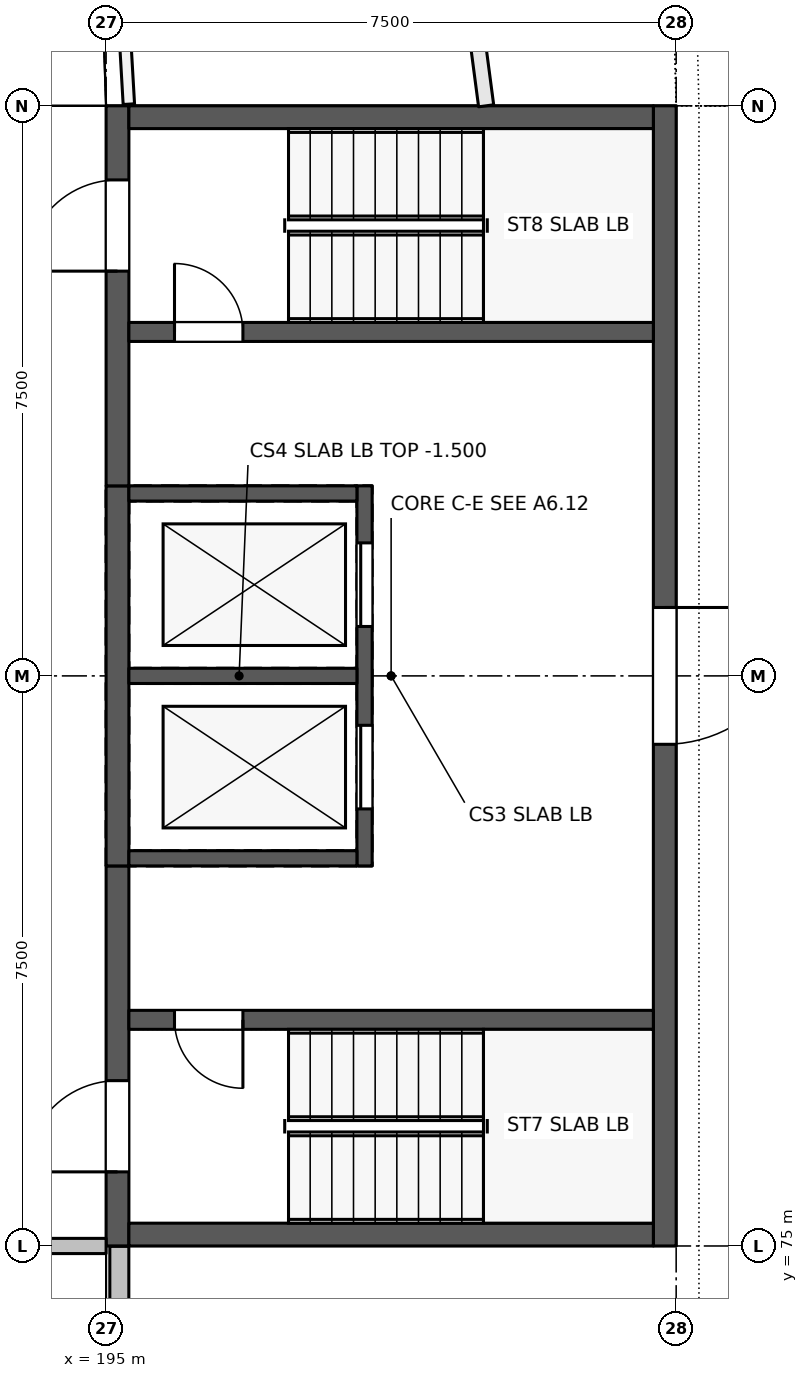
"""IFC4 building model, lengths in metres.
Left out: names, types, materials, properties, quantities, classifications, styles, units other than length and angle.
Written with IfcOpenShell. Run it as: python <this file> out.ifc"""

import sys

from ifc_helpers import new_model, si_unit, direction, frame, frame_2d, origin, place, context, subcontext, project, spatial, rectangle, extrude, element, fill, save


model = new_model("IFC4")
c1 = context("Model", 3, precision=1e-05, world=origin(), true_north=direction((0.0, 1.0)))
c2 = subcontext(c1, "Body", "Model", "MODEL_VIEW")
j1 = project(units=[si_unit("LENGTHUNIT", "METRE"), si_unit("PLANEANGLEUNIT", "RADIAN")], contexts=[c1])
p1 = place(None, origin())
s1 = spatial("IfcSite", under=j1, at=p1, CompositionType="ELEMENT")
p2 = place(p1, origin())
s2 = spatial("IfcBuilding", under=s1, at=p2, CompositionType="ELEMENT")
p3 = place(p2, origin())
s3 = spatial("IfcBuildingStorey", under=s2, at=p3, CompositionType="ELEMENT", Elevation=0.0)
p4 = place(p3, frame((199.08, 96.989, 0.0), z_axis=(0.0, 0.0, 1.0), x_axis=(0.130498411199, -0.991448518419, 0.0)))
e1 = element("IfcWall", 1, at=p4, inside=s3, PredefinedType="PARTITIONING", context=c2, shape_type="SweptSolid", body=[
    extrude(rectangle(XDim=7.049, YDim=0.2, at=frame_2d((3.525, 0.0))), origin(), (0.0, 0.0, 1.0), 2.548),
])
p5 = place(p4, frame((3.05, 0.0, 0.0)))
e2 = element("IfcOpeningElement", 2, at=p5, cuts=e1, PredefinedType="OPENING", context=c2, shape_type="SweptSolid", body=[
    extrude(rectangle(XDim=0.9, YDim=2.1, at=frame_2d((0.45, 1.05))), frame((0.0, 0.11, 0.0), z_axis=(0.0, -1.0, 0.0), x_axis=(1.0, 0.0, 0.0)), (0.0, 0.0, 1.0), 0.22),
])
p6 = place(p3, frame((195.174, 74.995, 0.0), z_axis=(0.0, 0.0, 1.0), x_axis=(0.0, -1.0, 0.0)))
e3 = element("IfcWall", 3, at=p6, inside=s3, PredefinedType="SOLIDWALL", context=c2, shape_type="SweptSolid", body=[
    extrude(rectangle(XDim=7.299, YDim=0.25, at=frame_2d((3.649, 0.0))), origin(), (0.0, 0.0, 1.0), 1.1),
])
p7 = place(p3, frame((187.656, 75.0, 0.0), z_axis=(0.0, 0.0, 1.0), x_axis=(1.0, 0.0, 0.0)))
e4 = element("IfcWall", 4, at=p7, inside=s3, PredefinedType="SOLIDWALL", context=c2, shape_type="SweptSolid", body=[
    extrude(rectangle(XDim=7.344, YDim=0.2, at=frame_2d((3.672, 0.0))), origin(), (0.0, 0.0, 1.0), 2.627),
])
p8 = place(p3, frame((202.35, 90.0, 0.0), z_axis=(0.0, 0.0, 1.0), x_axis=(0.0, -1.0, 0.0)))
e5 = element("IfcWall", 5, at=p8, inside=s3, PredefinedType="SHEAR", context=c2, shape_type="SweptSolid", body=[
    extrude(rectangle(XDim=15.0, YDim=0.3, at=frame_2d((7.5, 0.0))), origin(), (0.0, 0.0, 1.0), 3.3),
])
p9 = place(p8, frame((6.6, 0.0, 0.0)))
e6 = element("IfcOpeningElement", 6, at=p9, cuts=e5, PredefinedType="OPENING", context=c2, shape_type="SweptSolid", body=[
    extrude(rectangle(XDim=1.8, YDim=2.1, at=frame_2d((0.9, 1.05))), frame((0.0, 0.16, 0.0), z_axis=(0.0, -1.0, 0.0), x_axis=(1.0, 0.0, 0.0)), (0.0, 0.0, 1.0), 0.32),
])
p10 = place(p3, frame((195.15, 75.0, 0.0), z_axis=(0.0, 0.0, 1.0), x_axis=(0.0, 1.0, 0.0)))
e7 = element("IfcWall", 7, at=p10, inside=s3, PredefinedType="SHEAR", context=c2, shape_type="SweptSolid", body=[
    extrude(rectangle(XDim=5.0, YDim=0.3, at=frame_2d((2.5, 0.0))), origin(), (0.0, 0.0, 1.0), 3.3),
])
p11 = place(p10, frame((0.975, 0.0, 0.0)))
e8 = element("IfcOpeningElement", 8, at=p11, cuts=e7, PredefinedType="OPENING", context=c2, shape_type="SweptSolid", body=[
    extrude(rectangle(XDim=1.2, YDim=2.1, at=frame_2d((0.6, 1.05))), frame((0.0, 0.16, 0.0), z_axis=(0.0, -1.0, 0.0), x_axis=(1.0, 0.0, 0.0)), (0.0, 0.0, 1.0), 0.32),
])
p12 = place(p3, frame((195.15, 80.0, 0.0), z_axis=(0.0, 0.0, 1.0), x_axis=(0.0, 1.0, 0.0)))
e9 = element("IfcWall", 9, at=p12, inside=s3, PredefinedType="SHEAR", context=c2, shape_type="SweptSolid", body=[
    extrude(rectangle(XDim=5.0, YDim=0.3, at=frame_2d((2.5, 0.0))), origin(), (0.0, 0.0, 1.0), 3.3),
])
p13 = place(p3, frame((195.15, 85.0, 0.0), z_axis=(0.0, 0.0, 1.0), x_axis=(0.0, 1.0, 0.0)))
e10 = element("IfcWall", 10, at=p13, inside=s3, PredefinedType="SHEAR", context=c2, shape_type="SweptSolid", body=[
    extrude(rectangle(XDim=5.0, YDim=0.3, at=frame_2d((2.5, 0.0))), origin(), (0.0, 0.0, 1.0), 3.3),
])
p14 = place(p13, frame((2.825, 0.0, 0.0)))
e11 = element("IfcOpeningElement", 11, at=p14, cuts=e10, PredefinedType="OPENING", context=c2, shape_type="SweptSolid", body=[
    extrude(rectangle(XDim=1.2, YDim=2.1, at=frame_2d((0.6, 1.05))), frame((0.0, 0.16, 0.0), z_axis=(0.0, -1.0, 0.0), x_axis=(1.0, 0.0, 0.0)), (0.0, 0.0, 1.0), 0.32),
])
for number, where, z_axis, x_axis in (
    (12, (202.2, 75.15, 0.0), (0.0, 0.0, 1.0), (-1.0, 0.0, 0.0)),
    (13, (202.2, 89.85, 0.0), (0.0, 0.0, 1.0), (-1.0, 0.0, 0.0)),
):
    element("IfcWall", number, at=place(p3, frame(where, z_axis=z_axis, x_axis=x_axis)), inside=s3, PredefinedType="SHEAR", context=c2, shape_type="SweptSolid", body=[
        extrude(rectangle(XDim=6.9, YDim=0.3, at=frame_2d((3.45, 0.0))), origin(), (0.0, 0.0, 1.0), 3.3),
    ])
p15 = place(p3, frame((202.2, 77.975, 0.0), z_axis=(0.0, 0.0, 1.0), x_axis=(-1.0, 0.0, 0.0)))
e14 = element("IfcWall", 14, at=p15, inside=s3, PredefinedType="STANDARD", context=c2, shape_type="SweptSolid", body=[
    extrude(rectangle(XDim=6.9, YDim=0.25, at=frame_2d((3.45, 0.0))), origin(), (0.0, 0.0, 1.0), 3.1),
])
p16 = place(p15, frame((5.4, 0.0, 0.0)))
e15 = element("IfcOpeningElement", 15, at=p16, cuts=e14, PredefinedType="OPENING", context=c2, shape_type="SweptSolid", body=[
    extrude(rectangle(XDim=0.9, YDim=2.1, at=frame_2d((0.45, 1.05))), frame((0.0, 0.135, 0.0), z_axis=(0.0, -1.0, 0.0), x_axis=(1.0, 0.0, 0.0)), (0.0, 0.0, 1.0), 0.27),
])
p17 = place(p3, frame((195.3, 87.025, 0.0), z_axis=(0.0, 0.0, 1.0), x_axis=(1.0, 0.0, 0.0)))
e16 = element("IfcWall", 16, at=p17, inside=s3, PredefinedType="STANDARD", context=c2, shape_type="SweptSolid", body=[
    extrude(rectangle(XDim=6.9, YDim=0.25, at=frame_2d((3.45, 0.0))), origin(), (0.0, 0.0, 1.0), 3.1),
])
p18 = place(p17, frame((0.6, 0.0, 0.0)))
e17 = element("IfcOpeningElement", 17, at=p18, cuts=e16, PredefinedType="OPENING", context=c2, shape_type="SweptSolid", body=[
    extrude(rectangle(XDim=0.9, YDim=2.1, at=frame_2d((0.45, 1.05))), frame((0.0, 0.135, 0.0), z_axis=(0.0, -1.0, 0.0), x_axis=(1.0, 0.0, 0.0)), (0.0, 0.0, 1.0), 0.27),
])
p19 = place(p3, frame((198.4, 80.0, 0.0), z_axis=(0.0, 0.0, 1.0), x_axis=(0.0, 1.0, 0.0)))
e18 = element("IfcWall", 18, at=p19, inside=s3, PredefinedType="STANDARD", context=c2, shape_type="SweptSolid", body=[
    extrude(rectangle(XDim=5.0, YDim=0.2, at=frame_2d((2.5, 0.0))), origin(), (0.0, 0.0, 1.0), 3.1),
])
p20 = place(p19, frame((0.75, 0.0, 0.0)))
e19 = element("IfcOpeningElement", 19, at=p20, cuts=e18, PredefinedType="OPENING", context=c2, shape_type="SweptSolid", body=[
    extrude(rectangle(XDim=1.1, YDim=2.1, at=frame_2d((0.55, 1.05))), frame((0.0, 0.11, 0.0), z_axis=(0.0, -1.0, 0.0), x_axis=(1.0, 0.0, 0.0)), (0.0, 0.0, 1.0), 0.22),
])
p21 = place(p19, frame((3.15, 0.0, 0.0)))
e20 = element("IfcOpeningElement", 20, at=p21, cuts=e18, PredefinedType="OPENING", context=c2, shape_type="SweptSolid", body=[
    extrude(rectangle(XDim=1.1, YDim=2.1, at=frame_2d((0.55, 1.05))), frame((0.0, 0.11, 0.0), z_axis=(0.0, -1.0, 0.0), x_axis=(1.0, 0.0, 0.0)), (0.0, 0.0, 1.0), 0.22),
])
for number, where, z_axis, x_axis in (
    (21, (198.3, 80.1, 0.0), (0.0, 0.0, 1.0), (-1.0, 0.0, 0.0)),
    (22, (198.3, 82.5, 0.0), (0.0, 0.0, 1.0), (-1.0, 0.0, 0.0)),
    (23, (198.3, 84.9, 0.0), (0.0, 0.0, 1.0), (-1.0, 0.0, 0.0)),
):
    element("IfcWall", number, at=place(p3, frame(where, z_axis=z_axis, x_axis=x_axis)), inside=s3, PredefinedType="STANDARD", context=c2, shape_type="SweptSolid", body=[
        extrude(rectangle(XDim=3.0, YDim=0.2, at=frame_2d((1.5, 0.0))), origin(), (0.0, 0.0, 1.0), 3.1),
    ])
p22 = place(p3, frame((198.4, 80.0, -1.5), z_axis=(0.0, 0.0, 1.0), x_axis=(0.0, 1.0, 0.0)))
e24 = element("IfcWall", 24, at=p22, inside=s3, PredefinedType="STANDARD", context=c2, shape_type="SweptSolid", body=[
    extrude(rectangle(XDim=5.0, YDim=0.2, at=frame_2d((2.5, 0.0))), origin(), (0.0, 0.0, 1.0), 1.3),
])
for number, where, z_axis, x_axis in (
    (25, (198.3, 80.1, -1.5), (0.0, 0.0, 1.0), (-1.0, 0.0, 0.0)),
    (26, (198.3, 82.5, -1.5), (0.0, 0.0, 1.0), (-1.0, 0.0, 0.0)),
    (27, (198.3, 84.9, -1.5), (0.0, 0.0, 1.0), (-1.0, 0.0, 0.0)),
):
    element("IfcWall", number, at=place(p3, frame(where, z_axis=z_axis, x_axis=x_axis)), inside=s3, PredefinedType="STANDARD", context=c2, shape_type="SweptSolid", body=[
        extrude(rectangle(XDim=3.0, YDim=0.2, at=frame_2d((1.5, 0.0))), origin(), (0.0, 0.0, 1.0), 1.3),
    ])
p23 = place(p3, frame((195.15, 80.0, -1.5), z_axis=(0.0, 0.0, 1.0), x_axis=(0.0, 1.0, 0.0)))
e28 = element("IfcWall", 28, at=p23, inside=s3, PredefinedType="SHEAR", context=c2, shape_type="SweptSolid", body=[
    extrude(rectangle(XDim=5.0, YDim=0.3, at=frame_2d((2.5, 0.0))), origin(), (0.0, 0.0, 1.0), 1.3),
])
p24 = place(p9, origin())
e29 = element("IfcDoor", 29, at=p24, inside=s3, OperationType="DOUBLE_DOOR_SINGLE_SWING", PredefinedType="DOOR", context=c2, shape_type="SweptSolid", body=[
    extrude(rectangle(XDim=1.8, YDim=2.1, at=frame_2d((0.9, 1.05))), frame((0.0, 0.025, 0.0), z_axis=(0.0, -1.0, 0.0), x_axis=(1.0, 0.0, 0.0)), (0.0, 0.0, 1.0), 0.05),
])
fill(e6, e29)
p25 = place(p16, origin())
e30 = element("IfcDoor", 30, at=p25, inside=s3, OperationType="SINGLE_SWING_LEFT", PredefinedType="DOOR", context=c2, shape_type="SweptSolid", body=[
    extrude(rectangle(XDim=0.9, YDim=2.1, at=frame_2d((0.45, 1.05))), frame((0.0, 0.025, 0.0), z_axis=(0.0, -1.0, 0.0), x_axis=(1.0, 0.0, 0.0)), (0.0, 0.0, 1.0), 0.05),
])
fill(e15, e30)
p26 = place(p18, origin())
e31 = element("IfcDoor", 31, at=p26, inside=s3, OperationType="SINGLE_SWING_RIGHT", PredefinedType="DOOR", context=c2, shape_type="SweptSolid", body=[
    extrude(rectangle(XDim=0.9, YDim=2.1, at=frame_2d((0.45, 1.05))), frame((0.0, 0.025, 0.0), z_axis=(0.0, -1.0, 0.0), x_axis=(1.0, 0.0, 0.0)), (0.0, 0.0, 1.0), 0.05),
])
fill(e17, e31)
p27 = place(p20, origin())
e32 = element("IfcDoor", 32, at=p27, inside=s3, OperationType="DOUBLE_DOOR_SLIDING", PredefinedType="DOOR", context=c2, shape_type="SweptSolid", body=[
    extrude(rectangle(XDim=1.1, YDim=2.1, at=frame_2d((0.55, 1.05))), frame((0.0, 0.025, 0.0), z_axis=(0.0, -1.0, 0.0), x_axis=(1.0, 0.0, 0.0)), (0.0, 0.0, 1.0), 0.05),
])
fill(e19, e32)
p28 = place(p21, origin())
e33 = element("IfcDoor", 33, at=p28, inside=s3, OperationType="DOUBLE_DOOR_SLIDING", PredefinedType="DOOR", context=c2, shape_type="SweptSolid", body=[
    extrude(rectangle(XDim=1.1, YDim=2.1, at=frame_2d((0.55, 1.05))), frame((0.0, 0.025, 0.0), z_axis=(0.0, -1.0, 0.0), x_axis=(1.0, 0.0, 0.0)), (0.0, 0.0, 1.0), 0.05),
])
fill(e20, e33)
p29 = place(p11, origin())
e34 = element("IfcDoor", 34, at=p29, inside=s3, OperationType="SINGLE_SWING_LEFT", PredefinedType="DOOR", context=c2, shape_type="SweptSolid", body=[
    extrude(rectangle(XDim=1.2, YDim=2.1, at=frame_2d((0.6, 1.05))), frame((0.0, 0.025, 0.0), z_axis=(0.0, -1.0, 0.0), x_axis=(1.0, 0.0, 0.0)), (0.0, 0.0, 1.0), 0.05),
])
fill(e8, e34)
p30 = place(p14, origin())
e35 = element("IfcDoor", 35, at=p30, inside=s3, OperationType="SINGLE_SWING_RIGHT", PredefinedType="DOOR", context=c2, shape_type="SweptSolid", body=[
    extrude(rectangle(XDim=1.2, YDim=2.1, at=frame_2d((0.6, 1.05))), frame((0.0, 0.025, 0.0), z_axis=(0.0, -1.0, 0.0), x_axis=(1.0, 0.0, 0.0)), (0.0, 0.0, 1.0), 0.05),
])
fill(e11, e35)
save(model, sys.argv[1])
